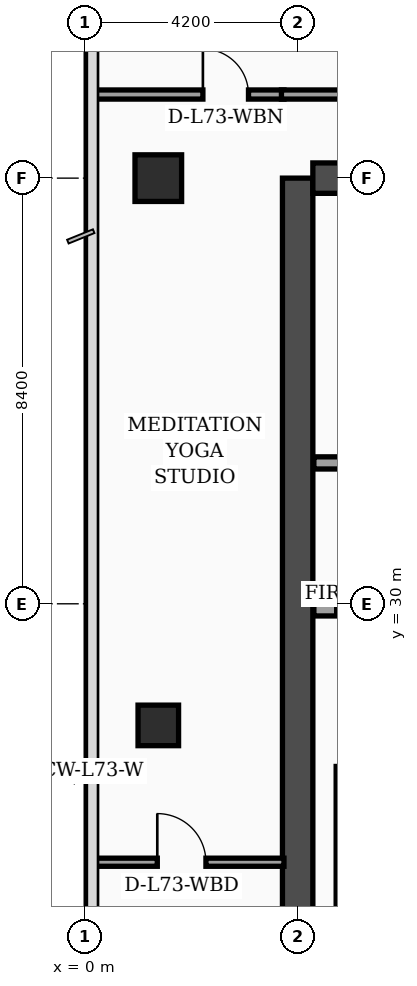
"""IFC4 building model, lengths in metres.
Left out: names, types, materials, properties, quantities, classifications, styles, units other than length and angle.
Written with IfcOpenShell. Run it as: python <this file> out.ifc"""

import sys

from ifc_helpers import new_model, si_unit, direction, frame, frame_2d, origin, origin_2d, place, context, subcontext, project, spatial, rectangle, extrude, element, fill, save


model = new_model("IFC4")
c1 = context("Model", 3, precision=1e-05, world=origin(), true_north=direction((0.0, 1.0)))
c2 = subcontext(c1, "Body", "Model", "MODEL_VIEW")
j1 = project(units=[si_unit("LENGTHUNIT", "METRE"), si_unit("PLANEANGLEUNIT", "RADIAN")], contexts=[c1])
p1 = place(None, origin())
s1 = spatial("IfcSite", under=j1, at=p1, CompositionType="ELEMENT")
p2 = place(p1, origin())
s2 = spatial("IfcBuilding", under=s1, at=p2, CompositionType="ELEMENT")
p3 = place(p2, frame((0.0, 0.0, 294.9)))
s3 = spatial("IfcBuildingStorey", under=s2, at=p3, CompositionType="ELEMENT", Elevation=294.9)
p4 = place(p3, frame((4.2, 16.8, 0.0), z_axis=(0.0, 0.0, 1.0), x_axis=(0.0, 1.0, 0.0)))
e1 = element("IfcWall", 1, at=p4, inside=s3, PredefinedType="SHEAR", context=c2, shape_type="SweptSolid", body=[
    extrude(rectangle(XDim=21.6, YDim=0.6, at=frame_2d((10.8, 0.0))), origin(), (0.0, 0.0, 1.0), 3.56),
])
p5 = place(p3, frame((4.5, 38.4, 0.0), z_axis=(0.0, 0.0, 1.0), x_axis=(1.0, 0.0, 0.0)))
e2 = element("IfcWall", 2, at=p5, inside=s3, PredefinedType="SHEAR", context=c2, shape_type="SweptSolid", body=[
    extrude(rectangle(XDim=10.2, YDim=0.6, at=frame_2d((5.1, 0.0))), origin(), (0.0, 0.0, 1.0), 3.56),
])
p6 = place(p5, frame((5.8, 0.0, 0.0)))
e3 = element("IfcOpeningElement", 3, at=p6, cuts=e2, PredefinedType="OPENING", context=c2, shape_type="SweptSolid", body=[
    extrude(rectangle(XDim=1.1, YDim=2.2, at=frame_2d((0.55, 1.1))), frame((0.0, 0.31, 0.0), z_axis=(0.0, -1.0, 0.0), x_axis=(1.0, 0.0, 0.0)), (0.0, 0.0, 1.0), 0.62),
])
p7 = place(p3, frame((5.08, 17.1, 0.0), z_axis=(0.0, 0.0, 1.0), x_axis=(0.0, 1.0, 0.0)))
e4 = element("IfcWall", 4, at=p7, inside=s3, PredefinedType="SOLIDWALL", context=c2, shape_type="SweptSolid", body=[
    extrude(rectangle(XDim=9.69, YDim=0.24, at=frame_2d((4.845, 0.0))), origin(), (0.0, 0.0, 1.0), 3.56),
])
p8 = place(p3, frame((1.45, 27.6, 0.0), z_axis=(0.0, 0.0, 1.0), x_axis=(1.0, 0.0, 0.0)))
e5 = element("IfcColumn", 5, at=p8, inside=s3, PredefinedType="COLUMN", context=c2, shape_type="SweptSolid", body=[
    extrude(rectangle(XDim=0.8, YDim=0.8, at=origin_2d()), origin(), (0.0, 0.0, 1.0), 3.56),
])
p9 = place(p3, frame((1.45, 38.4, 0.0), z_axis=(0.0, 0.0, 1.0), x_axis=(1.0, 0.0, 0.0)))
e6 = element("IfcColumn", 6, at=p9, inside=s3, PredefinedType="COLUMN", context=c2, shape_type="SweptSolid", body=[
    extrude(rectangle(XDim=0.92, YDim=0.92, at=origin_2d()), origin(), (0.0, 0.0, 1.0), 3.56),
])
p10 = place(p3, frame((4.52, 29.88, 0.0), z_axis=(0.0, 0.0, 1.0), x_axis=(1.0, 0.0, 0.0)))
e7 = element("IfcWall", 7, at=p10, inside=s3, PredefinedType="SOLIDWALL", context=c2, shape_type="SweptSolid", body=[
    extrude(rectangle(XDim=4.9, YDim=0.24, at=frame_2d((2.45, 0.0))), origin(), (0.0, 0.0, 1.0), 3.56),
])
p11 = place(p10, frame((0.45, 0.0, 0.0)))
e8 = element("IfcOpeningElement", 8, at=p11, cuts=e7, PredefinedType="OPENING", context=c2, shape_type="SweptSolid", body=[
    extrude(rectangle(XDim=1.3, YDim=2.35, at=frame_2d((0.65, 1.175))), frame((0.0, 0.13, 0.0), z_axis=(0.0, -1.0, 0.0), x_axis=(1.0, 0.0, 0.0)), (0.0, 0.0, 1.0), 0.26),
])
p12 = place(p3, frame((4.52, 32.78, 0.0), z_axis=(0.0, 0.0, 1.0), x_axis=(1.0, 0.0, 0.0)))
e9 = element("IfcWall", 9, at=p12, inside=s3, PredefinedType="SOLIDWALL", context=c2, shape_type="SweptSolid", body=[
    extrude(rectangle(XDim=4.9, YDim=0.24, at=frame_2d((2.45, 0.0))), origin(), (0.0, 0.0, 1.0), 3.19),
])
p13 = place(p3, frame((0.08, 24.9, 0.0), z_axis=(0.0, 0.0, 1.0), x_axis=(1.0, 0.0, 0.0)))
e10 = element("IfcWall", 10, at=p13, inside=s3, PredefinedType="PARTITIONING", context=c2, shape_type="SweptSolid", body=[
    extrude(rectangle(XDim=3.85, YDim=0.16, at=frame_2d((1.925, 0.0))), origin(), (0.0, 0.0, 1.0), 3.09),
])
p14 = place(p13, frame((1.35, 0.0, 0.0)))
e11 = element("IfcOpeningElement", 11, at=p14, cuts=e10, PredefinedType="OPENING", context=c2, shape_type="SweptSolid", body=[
    extrude(rectangle(XDim=0.96, YDim=2.2, at=frame_2d((0.48, 1.1))), frame((0.0, 0.09, 0.0), z_axis=(0.0, -1.0, 0.0), x_axis=(1.0, 0.0, 0.0)), (0.0, 0.0, 1.0), 0.18),
])
p15 = place(p3, frame((0.08, 40.05, 0.0), z_axis=(0.0, 0.0, 1.0), x_axis=(1.0, 0.0, 0.0)))
e12 = element("IfcWall", 12, at=p15, inside=s3, PredefinedType="PARTITIONING", context=c2, shape_type="SweptSolid", body=[
    extrude(rectangle(XDim=3.85, YDim=0.18, at=frame_2d((1.925, 0.0))), origin(), (0.0, 0.0, 1.0), 2.99),
])
p16 = place(p15, frame((2.25, 0.0, 0.0)))
e13 = element("IfcOpeningElement", 13, at=p16, cuts=e12, PredefinedType="OPENING", context=c2, shape_type="SweptSolid", body=[
    extrude(rectangle(XDim=0.9, YDim=2.15, at=frame_2d((0.45, 1.075))), frame((0.0, 0.1, 0.0), z_axis=(0.0, -1.0, 0.0), x_axis=(1.0, 0.0, 0.0)), (0.0, 0.0, 1.0), 0.2),
])
p17 = place(p3, frame((3.88, 40.05, 0.0), z_axis=(0.0, 0.0, 1.0), x_axis=(1.0, 0.0, 0.0)))
e14 = element("IfcWall", 14, at=p17, inside=s3, PredefinedType="PARTITIONING", context=c2, shape_type="SweptSolid", body=[
    extrude(rectangle(XDim=11.27, YDim=0.18, at=frame_2d((5.635, 0.0))), origin(), (0.0, 0.0, 1.0), 2.99),
])
p18 = place(p11, origin())
e15 = element("IfcDoor", 15, at=p18, inside=s3, OperationType="DOUBLE_DOOR_SLIDING", PredefinedType="DOOR", context=c2, shape_type="SweptSolid", body=[
    extrude(rectangle(XDim=1.3, YDim=2.35, at=frame_2d((0.65, 1.175))), frame((0.0, 0.025, 0.0), z_axis=(0.0, -1.0, 0.0), x_axis=(1.0, 0.0, 0.0)), (0.0, 0.0, 1.0), 0.05),
])
fill(e8, e15)
p19 = place(p14, origin())
e16 = element("IfcDoor", 16, at=p19, inside=s3, OperationType="SINGLE_SWING_LEFT", PredefinedType="DOOR", context=c2, shape_type="SweptSolid", body=[
    extrude(rectangle(XDim=0.96, YDim=2.2, at=frame_2d((0.48, 1.1))), frame((0.0, 0.025, 0.0), z_axis=(0.0, -1.0, 0.0), x_axis=(1.0, 0.0, 0.0)), (0.0, 0.0, 1.0), 0.05),
])
fill(e11, e16)
p20 = place(p16, origin())
e17 = element("IfcDoor", 17, at=p20, inside=s3, OperationType="SINGLE_SWING_LEFT", PredefinedType="DOOR", context=c2, shape_type="SweptSolid", body=[
    extrude(rectangle(XDim=0.9, YDim=2.15, at=frame_2d((0.45, 1.075))), frame((0.0, 0.025, 0.0), z_axis=(0.0, -1.0, 0.0), x_axis=(1.0, 0.0, 0.0)), (0.0, 0.0, 1.0), 0.05),
])
fill(e13, e17)
save(model, sys.argv[1])
